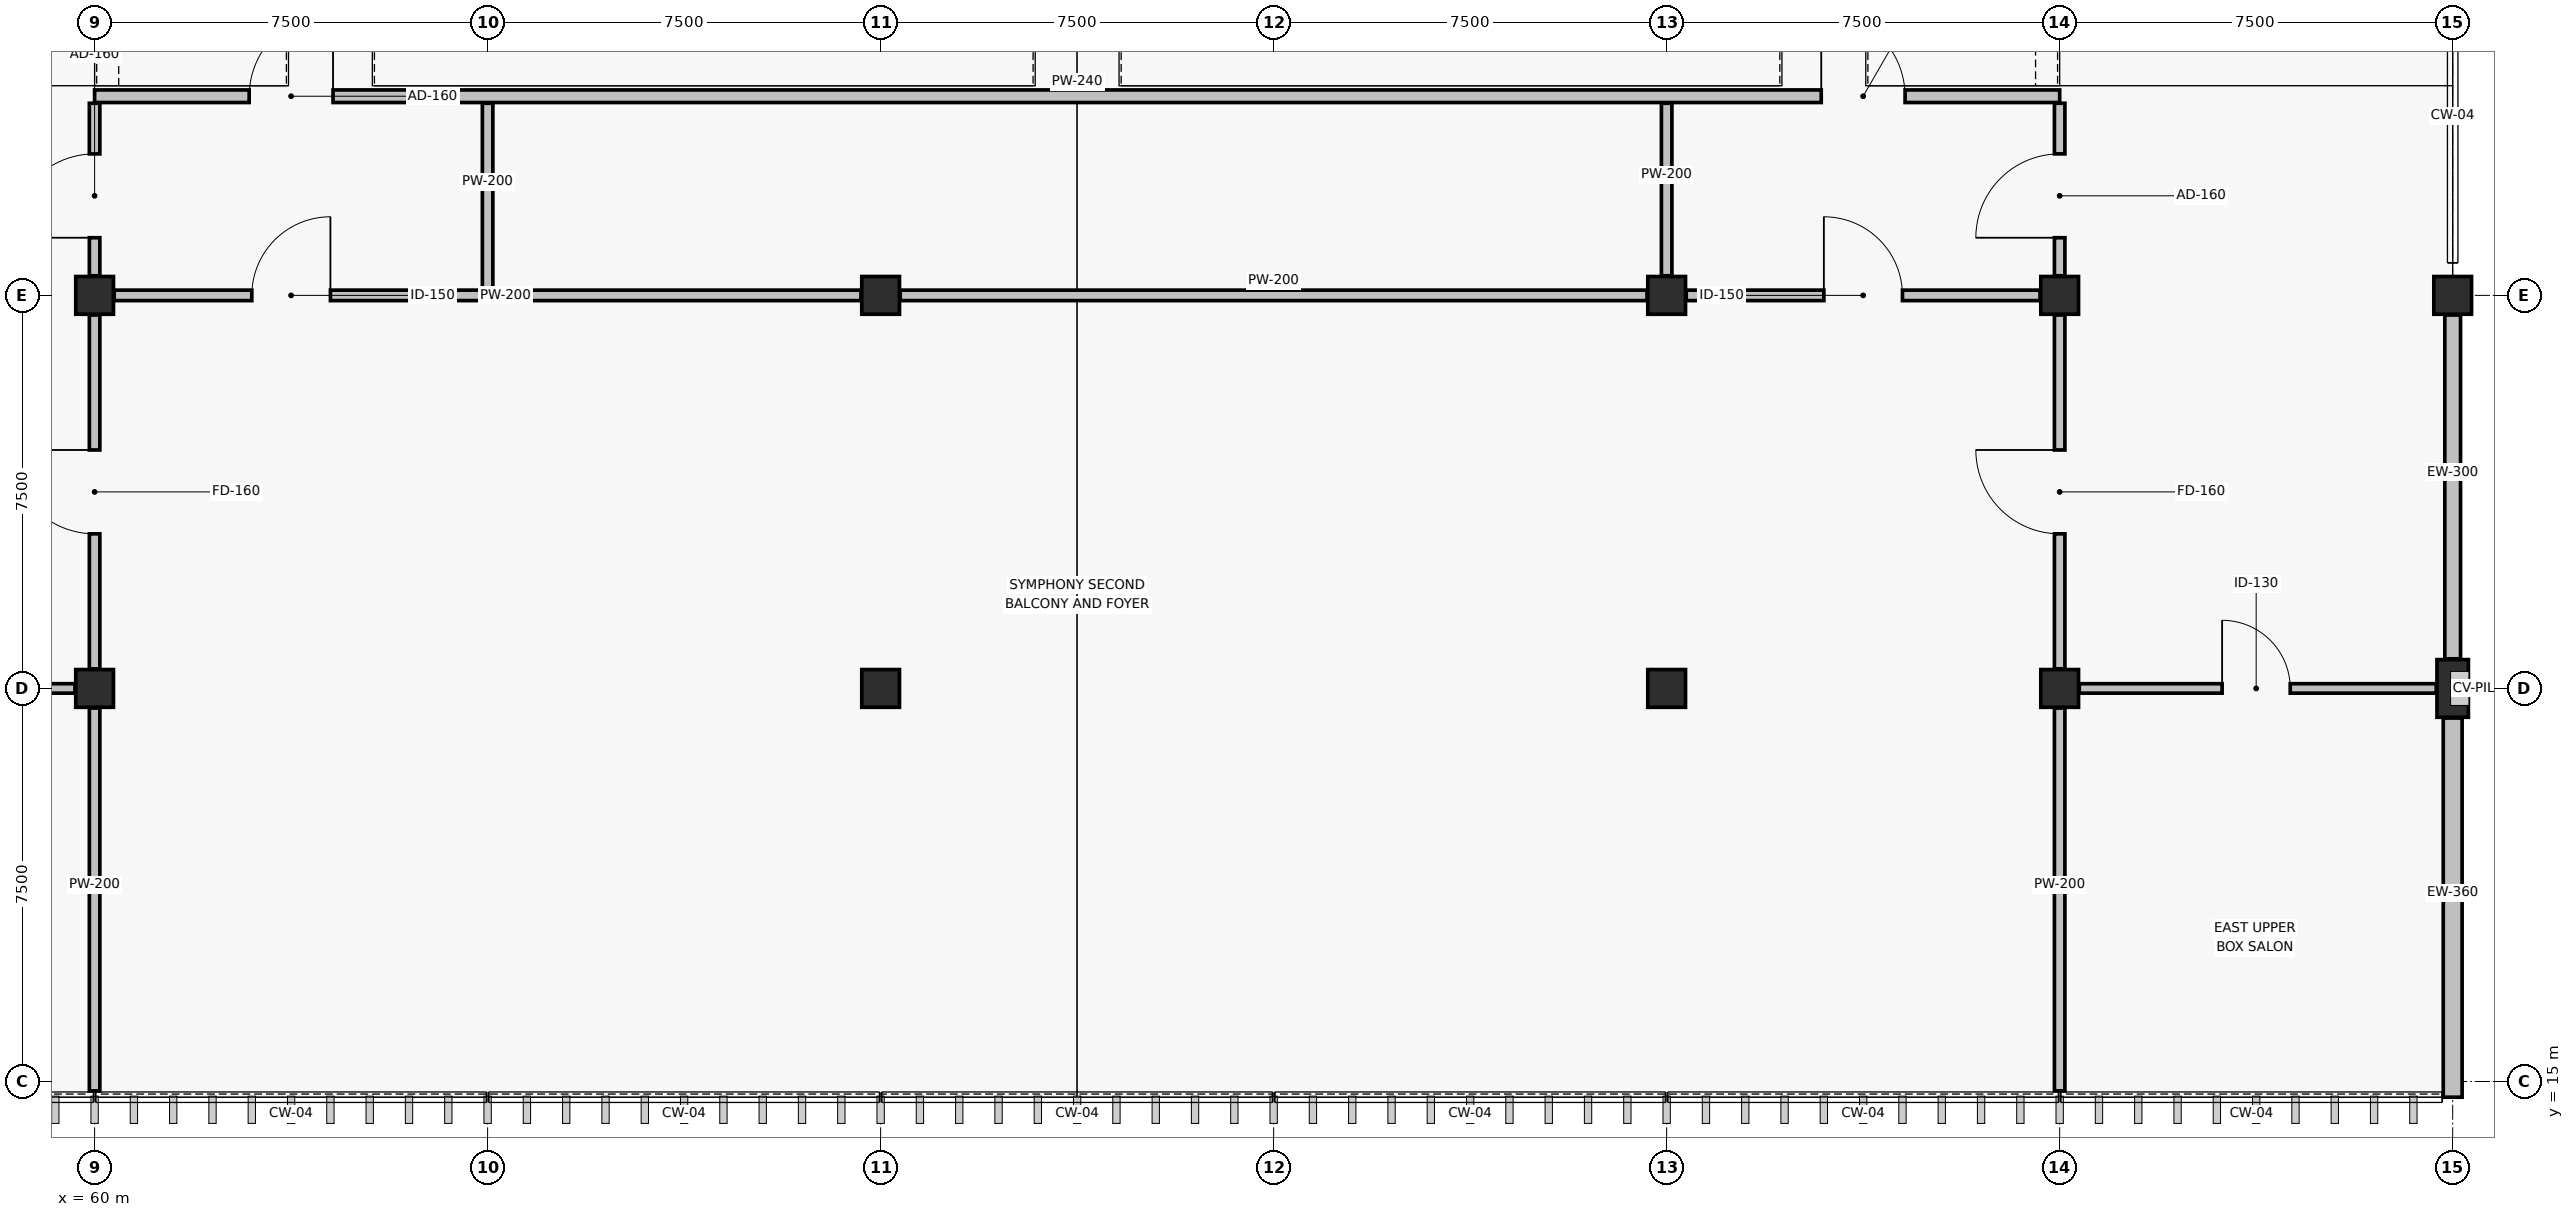
"""IFC4 building model, lengths in metres.
Left out: names, types, materials, properties, quantities, classifications, styles, units other than length and angle.
Written with IfcOpenShell. Run it as: python <this file> out.ifc"""

import sys

from ifc_helpers import new_model, si_unit, direction, frame, frame_2d, origin, origin_2d, place, context, subcontext, project, spatial, rectangle, extrude, element, fill, save


model = new_model("IFC4")
c1 = context("Model", 3, precision=1e-05, world=origin(), true_north=direction((0.0, 1.0)))
c2 = subcontext(c1, "Body", "Model", "MODEL_VIEW")
j1 = project(units=[si_unit("LENGTHUNIT", "METRE"), si_unit("PLANEANGLEUNIT", "RADIAN")], contexts=[c1])
p1 = place(None, origin())
s1 = spatial("IfcSite", under=j1, at=p1, CompositionType="ELEMENT")
p2 = place(p1, origin())
s2 = spatial("IfcBuilding", under=s1, at=p2, CompositionType="ELEMENT")
p3 = place(p2, frame((0.0, 0.0, 13.2)))
s3 = spatial("IfcBuildingStorey", under=s2, at=p3, CompositionType="ELEMENT", Elevation=13.2)
for number, where, z_axis, x_axis in (
    (1, (60.0, 22.5, 0.0), (0.0, 0.0, 1.0), (1.0, 0.0, 0.0)),
    (2, (60.0, 30.0, 0.0), (0.0, 0.0, 1.0), (1.0, 0.0, 0.0)),
    (3, (75.0, 22.5, 0.0), (0.0, 0.0, 1.0), (1.0, 0.0, 0.0)),
    (4, (75.0, 30.0, 0.0), (0.0, 0.0, 1.0), (1.0, 0.0, 0.0)),
    (5, (90.0, 22.5, 0.0), (0.0, 0.0, 1.0), (1.0, 0.0, 0.0)),
    (6, (90.0, 30.0, 0.0), (0.0, 0.0, 1.0), (1.0, 0.0, 0.0)),
    (7, (97.5, 22.5, 0.0), (0.0, 0.0, 1.0), (1.0, 0.0, 0.0)),
    (8, (97.5, 30.0, 0.0), (0.0, 0.0, 1.0), (1.0, 0.0, 0.0)),
):
    element("IfcColumn", number, at=place(p3, frame(where, z_axis=z_axis, x_axis=x_axis)), inside=s3, PredefinedType="COLUMN", context=c2, shape_type="SweptSolid", body=[
        extrude(rectangle(XDim=0.72, YDim=0.72, at=origin_2d()), origin(), (0.0, 0.0, 1.0), 3.9),
    ])
p4 = place(p3, frame((105.0, 22.5, 0.0), z_axis=(0.0, 0.0, 1.0), x_axis=(1.0, 0.0, 0.0)))
e9 = element("IfcColumn", 9, at=p4, inside=s3, PredefinedType="COLUMN", context=c2, shape_type="SweptSolid", body=[
    extrude(rectangle(XDim=0.6, YDim=1.1, at=origin_2d()), origin(), (0.0, 0.0, 1.0), 3.9),
])
p5 = place(p3, frame((105.0, 30.0, 0.0), z_axis=(0.0, 0.0, 1.0), x_axis=(1.0, 0.0, 0.0)))
e10 = element("IfcColumn", 10, at=p5, inside=s3, PredefinedType="COLUMN", context=c2, shape_type="SweptSolid", body=[
    extrude(rectangle(XDim=0.72, YDim=0.72, at=origin_2d()), origin(), (0.0, 0.0, 1.0), 3.9),
])
p6 = place(p3, frame((105.0, 14.7, 0.0), z_axis=(0.0, 0.0, 1.0), x_axis=(0.0, 1.0, 0.0)))
e11 = element("IfcWall", 11, at=p6, inside=s3, PredefinedType="SOLIDWALL", context=c2, shape_type="SweptSolid", body=[
    extrude(rectangle(XDim=7.235, YDim=0.36, at=frame_2d((3.618, 0.0))), origin(), (0.0, 0.0, 1.0), 2.39),
])
p7 = place(p3, frame((105.0, 23.065, 0.0), z_axis=(0.0, 0.0, 1.0), x_axis=(0.0, 1.0, 0.0)))
e12 = element("IfcWall", 12, at=p7, inside=s3, PredefinedType="SOLIDWALL", context=c2, shape_type="SweptSolid", body=[
    extrude(rectangle(XDim=6.56, YDim=0.3, at=frame_2d((3.28, 0.0))), origin(), (0.0, 0.0, 1.0), 2.39),
])
p8 = place(p3, frame((52.814, 22.5, 0.0), z_axis=(0.0, 0.0, 1.0), x_axis=(1.0, 0.0, 0.0)))
e13 = element("IfcWall", 13, at=p8, inside=s3, PredefinedType="PARTITIONING", context=c2, shape_type="SweptSolid", body=[
    extrude(rectangle(XDim=6.812, YDim=0.18, at=frame_2d((3.406, 0.0))), origin(), (0.0, 0.0, 1.0), 2.39),
])
p9 = place(p8, frame((2.786, 0.0, 0.0)))
e14 = element("IfcOpeningElement", 14, at=p9, cuts=e13, PredefinedType="OPENING", context=c2, shape_type="SweptSolid", body=[
    extrude(rectangle(XDim=1.3, YDim=2.15, at=frame_2d((0.65, 1.075))), frame((0.0, 0.1, 0.0), z_axis=(0.0, -1.0, 0.0), x_axis=(1.0, 0.0, 0.0)), (0.0, 0.0, 1.0), 0.2),
])
p10 = place(p3, frame((97.874, 22.5, 0.0), z_axis=(0.0, 0.0, 1.0), x_axis=(1.0, 0.0, 0.0)))
e15 = element("IfcWall", 15, at=p10, inside=s3, PredefinedType="PARTITIONING", context=c2, shape_type="SweptSolid", body=[
    extrude(rectangle(XDim=6.812, YDim=0.18, at=frame_2d((3.406, 0.0))), origin(), (0.0, 0.0, 1.0), 2.39),
])
p11 = place(p10, frame((2.726, 0.0, 0.0)))
e16 = element("IfcOpeningElement", 16, at=p11, cuts=e15, PredefinedType="OPENING", context=c2, shape_type="SweptSolid", body=[
    extrude(rectangle(XDim=1.3, YDim=2.15, at=frame_2d((0.65, 1.075))), frame((0.0, 0.1, 0.0), z_axis=(0.0, -1.0, 0.0), x_axis=(1.0, 0.0, 0.0)), (0.0, 0.0, 1.0), 0.2),
])
p12 = place(p3, frame((60.374, 30.0, 0.0), z_axis=(0.0, 0.0, 1.0), x_axis=(1.0, 0.0, 0.0)))
e17 = element("IfcWall", 17, at=p12, inside=s3, PredefinedType="PARTITIONING", context=c2, shape_type="SweptSolid", body=[
    extrude(rectangle(XDim=14.252, YDim=0.2, at=frame_2d((7.126, 0.0))), origin(), (0.0, 0.0, 1.0), 2.39),
])
p13 = place(p12, frame((2.626, 0.0, 0.0)))
e18 = element("IfcOpeningElement", 18, at=p13, cuts=e17, PredefinedType="OPENING", context=c2, shape_type="SweptSolid", body=[
    extrude(rectangle(XDim=1.5, YDim=2.16, at=frame_2d((0.75, 1.08))), frame((0.0, 0.11, 0.0), z_axis=(0.0, -1.0, 0.0), x_axis=(1.0, 0.0, 0.0)), (0.0, 0.0, 1.0), 0.22),
])
p14 = place(p3, frame((75.374, 30.0, 0.0), z_axis=(0.0, 0.0, 1.0), x_axis=(1.0, 0.0, 0.0)))
e19 = element("IfcWall", 19, at=p14, inside=s3, PredefinedType="PARTITIONING", context=c2, shape_type="SweptSolid", body=[
    extrude(rectangle(XDim=14.252, YDim=0.2, at=frame_2d((7.126, 0.0))), origin(), (0.0, 0.0, 1.0), 2.59),
])
p15 = place(p3, frame((90.374, 30.0, 0.0), z_axis=(0.0, 0.0, 1.0), x_axis=(1.0, 0.0, 0.0)))
e20 = element("IfcWall", 20, at=p15, inside=s3, PredefinedType="PARTITIONING", context=c2, shape_type="SweptSolid", body=[
    extrude(rectangle(XDim=6.752, YDim=0.2, at=frame_2d((3.376, 0.0))), origin(), (0.0, 0.0, 1.0), 2.39),
])
p16 = place(p15, frame((2.626, 0.0, 0.0)))
e21 = element("IfcOpeningElement", 21, at=p16, cuts=e20, PredefinedType="OPENING", context=c2, shape_type="SweptSolid", body=[
    extrude(rectangle(XDim=1.5, YDim=2.16, at=frame_2d((0.75, 1.08))), frame((0.0, 0.11, 0.0), z_axis=(0.0, -1.0, 0.0), x_axis=(1.0, 0.0, 0.0)), (0.0, 0.0, 1.0), 0.22),
])
p17 = place(p3, frame((60.0, 33.8, 0.0), z_axis=(0.0, 0.0, 1.0), x_axis=(1.0, 0.0, 0.0)))
e22 = element("IfcWall", 22, at=p17, inside=s3, PredefinedType="PARTITIONING", context=c2, shape_type="SweptSolid", body=[
    extrude(rectangle(XDim=37.5, YDim=0.24, at=frame_2d((18.75, 0.0))), origin(), (0.0, 0.0, 1.0), 2.39),
])
p18 = place(p17, frame((2.95, 0.0, 0.0)))
e23 = element("IfcOpeningElement", 23, at=p18, cuts=e22, PredefinedType="OPENING", context=c2, shape_type="SweptSolid", body=[
    extrude(rectangle(XDim=1.6, YDim=2.16, at=frame_2d((0.8, 1.08))), frame((0.0, 0.13, 0.0), z_axis=(0.0, -1.0, 0.0), x_axis=(1.0, 0.0, 0.0)), (0.0, 0.0, 1.0), 0.26),
])
p19 = place(p17, frame((32.95, 0.0, 0.0)))
e24 = element("IfcOpeningElement", 24, at=p19, cuts=e22, PredefinedType="OPENING", context=c2, shape_type="SweptSolid", body=[
    extrude(rectangle(XDim=1.6, YDim=2.16, at=frame_2d((0.8, 1.08))), frame((0.0, 0.13, 0.0), z_axis=(0.0, -1.0, 0.0), x_axis=(1.0, 0.0, 0.0)), (0.0, 0.0, 1.0), 0.26),
])
p20 = place(p3, frame((67.5, 30.114, 0.0), z_axis=(0.0, 0.0, 1.0), x_axis=(0.0, 1.0, 0.0)))
e25 = element("IfcWall", 25, at=p20, inside=s3, PredefinedType="PARTITIONING", context=c2, shape_type="SweptSolid", body=[
    extrude(rectangle(XDim=3.552, YDim=0.2, at=frame_2d((1.776, 0.0))), origin(), (0.0, 0.0, 1.0), 2.59),
])
p21 = place(p3, frame((90.0, 30.374, 0.0), z_axis=(0.0, 0.0, 1.0), x_axis=(0.0, 1.0, 0.0)))
e26 = element("IfcWall", 26, at=p21, inside=s3, PredefinedType="PARTITIONING", context=c2, shape_type="SweptSolid", body=[
    extrude(rectangle(XDim=3.292, YDim=0.2, at=frame_2d((1.646, 0.0))), origin(), (0.0, 0.0, 1.0), 2.59),
])
p22 = place(p3, frame((60.0, 14.82, 0.0), z_axis=(0.0, 0.0, 1.0), x_axis=(0.0, 1.0, 0.0)))
e27 = element("IfcWall", 27, at=p22, inside=s3, PredefinedType="PARTITIONING", context=c2, shape_type="SweptSolid", body=[
    extrude(rectangle(XDim=7.306, YDim=0.2, at=frame_2d((3.653, 0.0))), origin(), (0.0, 0.0, 1.0), 2.39),
])
p23 = place(p3, frame((60.0, 22.874, 0.0), z_axis=(0.0, 0.0, 1.0), x_axis=(0.0, 1.0, 0.0)))
e28 = element("IfcWall", 28, at=p23, inside=s3, PredefinedType="PARTITIONING", context=c2, shape_type="SweptSolid", body=[
    extrude(rectangle(XDim=6.752, YDim=0.2, at=frame_2d((3.376, 0.0))), origin(), (0.0, 0.0, 1.0), 2.39),
])
p24 = place(p23, frame((2.576, 0.0, 0.0)))
e29 = element("IfcOpeningElement", 29, at=p24, cuts=e28, PredefinedType="OPENING", context=c2, shape_type="SweptSolid", body=[
    extrude(rectangle(XDim=1.6, YDim=2.15, at=frame_2d((0.8, 1.075))), frame((0.0, 0.11, 0.0), z_axis=(0.0, -1.0, 0.0), x_axis=(1.0, 0.0, 0.0)), (0.0, 0.0, 1.0), 0.22),
])
p25 = place(p3, frame((60.0, 30.374, 0.0), z_axis=(0.0, 0.0, 1.0), x_axis=(0.0, 1.0, 0.0)))
e30 = element("IfcWall", 30, at=p25, inside=s3, PredefinedType="PARTITIONING", context=c2, shape_type="SweptSolid", body=[
    extrude(rectangle(XDim=3.292, YDim=0.2, at=frame_2d((1.646, 0.0))), origin(), (0.0, 0.0, 1.0), 2.39),
])
p26 = place(p25, frame((0.726, 0.0, 0.0)))
e31 = element("IfcOpeningElement", 31, at=p26, cuts=e30, PredefinedType="OPENING", context=c2, shape_type="SweptSolid", body=[
    extrude(rectangle(XDim=1.6, YDim=2.16, at=frame_2d((0.8, 1.08))), frame((0.0, 0.11, 0.0), z_axis=(0.0, -1.0, 0.0), x_axis=(1.0, 0.0, 0.0)), (0.0, 0.0, 1.0), 0.22),
])
p27 = place(p3, frame((97.5, 14.82, 0.0), z_axis=(0.0, 0.0, 1.0), x_axis=(0.0, 1.0, 0.0)))
e32 = element("IfcWall", 32, at=p27, inside=s3, PredefinedType="PARTITIONING", context=c2, shape_type="SweptSolid", body=[
    extrude(rectangle(XDim=7.306, YDim=0.2, at=frame_2d((3.653, 0.0))), origin(), (0.0, 0.0, 1.0), 2.39),
])
p28 = place(p3, frame((97.5, 22.874, 0.0), z_axis=(0.0, 0.0, 1.0), x_axis=(0.0, 1.0, 0.0)))
e33 = element("IfcWall", 33, at=p28, inside=s3, PredefinedType="PARTITIONING", context=c2, shape_type="SweptSolid", body=[
    extrude(rectangle(XDim=6.752, YDim=0.2, at=frame_2d((3.376, 0.0))), origin(), (0.0, 0.0, 1.0), 2.39),
])
p29 = place(p28, frame((2.576, 0.0, 0.0)))
e34 = element("IfcOpeningElement", 34, at=p29, cuts=e33, PredefinedType="OPENING", context=c2, shape_type="SweptSolid", body=[
    extrude(rectangle(XDim=1.6, YDim=2.15, at=frame_2d((0.8, 1.075))), frame((0.0, 0.11, 0.0), z_axis=(0.0, -1.0, 0.0), x_axis=(1.0, 0.0, 0.0)), (0.0, 0.0, 1.0), 0.22),
])
p30 = place(p3, frame((97.5, 30.374, 0.0), z_axis=(0.0, 0.0, 1.0), x_axis=(0.0, 1.0, 0.0)))
e35 = element("IfcWall", 35, at=p30, inside=s3, PredefinedType="PARTITIONING", context=c2, shape_type="SweptSolid", body=[
    extrude(rectangle(XDim=3.292, YDim=0.2, at=frame_2d((1.646, 0.0))), origin(), (0.0, 0.0, 1.0), 2.39),
])
p31 = place(p30, frame((0.726, 0.0, 0.0)))
e36 = element("IfcOpeningElement", 36, at=p31, cuts=e35, PredefinedType="OPENING", context=c2, shape_type="SweptSolid", body=[
    extrude(rectangle(XDim=1.6, YDim=2.16, at=frame_2d((0.8, 1.08))), frame((0.0, 0.11, 0.0), z_axis=(0.0, -1.0, 0.0), x_axis=(1.0, 0.0, 0.0)), (0.0, 0.0, 1.0), 0.22),
])
p32 = place(p11, origin())
e37 = element("IfcDoor", 37, at=p32, inside=s3, OperationType="SINGLE_SWING_LEFT", PredefinedType="DOOR", context=c2, shape_type="SweptSolid", body=[
    extrude(rectangle(XDim=1.3, YDim=2.15, at=frame_2d((0.65, 1.075))), frame((0.0, 0.025, 0.0), z_axis=(0.0, -1.0, 0.0), x_axis=(1.0, 0.0, 0.0)), (0.0, 0.0, 1.0), 0.05),
])
fill(e16, e37)
p33 = place(p13, origin())
e38 = element("IfcDoor", 38, at=p33, inside=s3, OperationType="SINGLE_SWING_RIGHT", PredefinedType="DOOR", context=c2, shape_type="SweptSolid", body=[
    extrude(rectangle(XDim=1.5, YDim=2.16, at=frame_2d((0.75, 1.08))), frame((0.0, 0.025, 0.0), z_axis=(0.0, -1.0, 0.0), x_axis=(1.0, 0.0, 0.0)), (0.0, 0.0, 1.0), 0.05),
])
fill(e18, e38)
p34 = place(p16, origin())
e39 = element("IfcDoor", 39, at=p34, inside=s3, OperationType="SINGLE_SWING_LEFT", PredefinedType="DOOR", context=c2, shape_type="SweptSolid", body=[
    extrude(rectangle(XDim=1.5, YDim=2.16, at=frame_2d((0.75, 1.08))), frame((0.0, 0.025, 0.0), z_axis=(0.0, -1.0, 0.0), x_axis=(1.0, 0.0, 0.0)), (0.0, 0.0, 1.0), 0.05),
])
fill(e21, e39)
p35 = place(p18, origin())
e40 = element("IfcDoor", 40, at=p35, inside=s3, OperationType="SINGLE_SWING_RIGHT", PredefinedType="DOOR", context=c2, shape_type="SweptSolid", body=[
    extrude(rectangle(XDim=1.6, YDim=2.16, at=frame_2d((0.8, 1.08))), frame((0.0, 0.025, 0.0), z_axis=(0.0, -1.0, 0.0), x_axis=(1.0, 0.0, 0.0)), (0.0, 0.0, 1.0), 0.05),
])
fill(e23, e40)
p36 = place(p19, origin())
e41 = element("IfcDoor", 41, at=p36, inside=s3, OperationType="SINGLE_SWING_LEFT", PredefinedType="DOOR", context=c2, shape_type="SweptSolid", body=[
    extrude(rectangle(XDim=1.6, YDim=2.16, at=frame_2d((0.8, 1.08))), frame((0.0, 0.025, 0.0), z_axis=(0.0, -1.0, 0.0), x_axis=(1.0, 0.0, 0.0)), (0.0, 0.0, 1.0), 0.05),
])
fill(e24, e41)
p37 = place(p24, origin())
e42 = element("IfcDoor", 42, at=p37, inside=s3, OperationType="SINGLE_SWING_RIGHT", PredefinedType="DOOR", context=c2, shape_type="SweptSolid", body=[
    extrude(rectangle(XDim=1.6, YDim=2.15, at=frame_2d((0.8, 1.075))), frame((0.0, 0.025, 0.0), z_axis=(0.0, -1.0, 0.0), x_axis=(1.0, 0.0, 0.0)), (0.0, 0.0, 1.0), 0.05),
])
fill(e29, e42)
p38 = place(p26, origin())
e43 = element("IfcDoor", 43, at=p38, inside=s3, OperationType="SINGLE_SWING_LEFT", PredefinedType="DOOR", context=c2, shape_type="SweptSolid", body=[
    extrude(rectangle(XDim=1.6, YDim=2.16, at=frame_2d((0.8, 1.08))), frame((0.0, 0.025, 0.0), z_axis=(0.0, -1.0, 0.0), x_axis=(1.0, 0.0, 0.0)), (0.0, 0.0, 1.0), 0.05),
])
fill(e31, e43)
p39 = place(p29, origin())
e44 = element("IfcDoor", 44, at=p39, inside=s3, OperationType="SINGLE_SWING_RIGHT", PredefinedType="DOOR", context=c2, shape_type="SweptSolid", body=[
    extrude(rectangle(XDim=1.6, YDim=2.15, at=frame_2d((0.8, 1.075))), frame((0.0, 0.025, 0.0), z_axis=(0.0, -1.0, 0.0), x_axis=(1.0, 0.0, 0.0)), (0.0, 0.0, 1.0), 0.05),
])
fill(e34, e44)
p40 = place(p31, origin())
e45 = element("IfcDoor", 45, at=p40, inside=s3, OperationType="SINGLE_SWING_LEFT", PredefinedType="DOOR", context=c2, shape_type="SweptSolid", body=[
    extrude(rectangle(XDim=1.6, YDim=2.16, at=frame_2d((0.8, 1.08))), frame((0.0, 0.025, 0.0), z_axis=(0.0, -1.0, 0.0), x_axis=(1.0, 0.0, 0.0)), (0.0, 0.0, 1.0), 0.05),
])
fill(e36, e45)
save(model, sys.argv[1])
